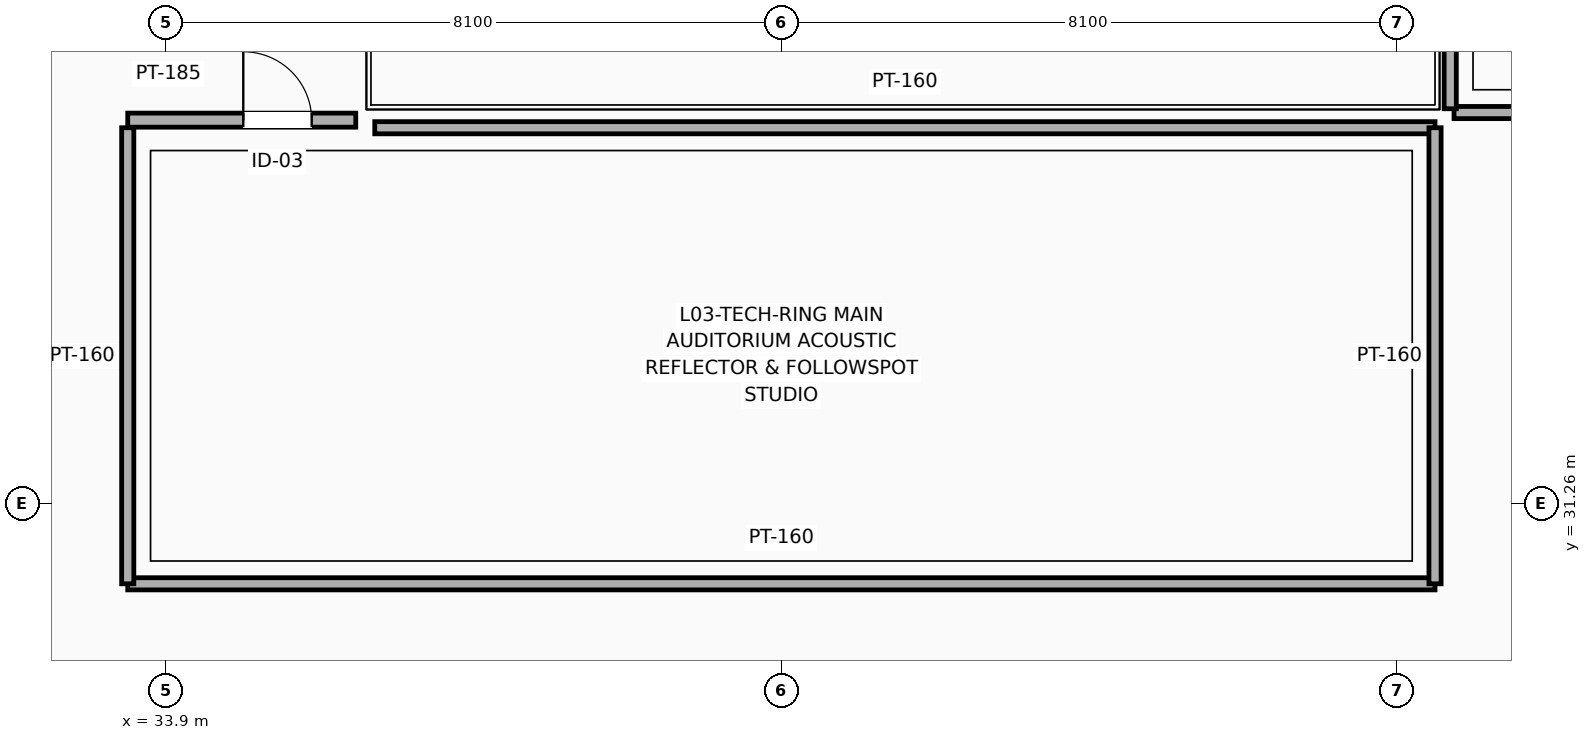
"""IFC4 building model, lengths in metres.
Left out: names, types, materials, properties, quantities, classifications, styles, units other than length and angle.
Written with IfcOpenShell. Run it as: python <this file> out.ifc"""

import sys

from ifc_helpers import new_model, si_unit, direction, frame, frame_2d, origin, place, context, subcontext, project, spatial, rectangle, extrude, element, fill, save


model = new_model("IFC4")
c1 = context("Model", 3, precision=1e-05, world=origin(), true_north=direction((0.0, 1.0)))
c2 = subcontext(c1, "Body", "Model", "MODEL_VIEW")
j1 = project(units=[si_unit("LENGTHUNIT", "METRE"), si_unit("PLANEANGLEUNIT", "RADIAN")], contexts=[c1])
p1 = place(None, origin())
s1 = spatial("IfcSite", under=j1, at=p1, CompositionType="ELEMENT")
p2 = place(p1, origin())
s2 = spatial("IfcBuilding", under=s1, at=p2, CompositionType="ELEMENT")
p3 = place(p2, frame((0.0, 0.0, 14.7)))
s3 = spatial("IfcBuildingStorey", under=s2, at=p3, CompositionType="ELEMENT", Elevation=14.7)
for number, where, z_axis, x_axis in (
    (1, (52.396, 29.725, 0.0), (0.0, 0.0, 1.0), (-0.672, -0.741, 0.0)),
    (2, (33.91, 27.182, 0.0), (0.0, 0.0, 1.0), (-0.672, 0.741, 0.0)),
):
    element("IfcWall", number, at=place(p3, frame(where, z_axis=z_axis, x_axis=x_axis)), inside=s3, PredefinedType="SHEAR", context=c2, shape_type="SweptSolid", body=[
        extrude(rectangle(XDim=3.433, YDim=0.4, at=frame_2d((1.717, 0.0))), origin(), (0.0, 0.0, 1.0), 13.227),
    ])
p4 = place(p3, frame((33.4, 36.3, 0.0), z_axis=(0.0, 0.0, 1.0), x_axis=(1.0, 0.0, 0.0)))
e3 = element("IfcWall", 3, at=p4, inside=s3, PredefinedType="PARTITIONING", context=c2, shape_type="SweptSolid", body=[
    extrude(rectangle(XDim=3.0, YDim=0.185, at=frame_2d((1.5, 0.0))), origin(), (0.0, 0.0, 1.0), 4.225),
])
p5 = place(p4, frame((1.52, 0.0, 0.0)))
e4 = element("IfcOpeningElement", 4, at=p5, cuts=e3, PredefinedType="OPENING", context=c2, shape_type="SweptSolid", body=[
    extrude(rectangle(XDim=0.9, YDim=2.1, at=frame_2d((0.45, 1.05))), frame((0.0, 0.103, 0.0), z_axis=(0.0, -1.0, 0.0), x_axis=(1.0, 0.0, 0.0)), (0.0, 0.0, 1.0), 0.205),
])
p6 = place(p3, frame((33.4, 30.2, 0.0), z_axis=(0.0, 0.0, 1.0), x_axis=(1.0, 0.0, 0.0)))
e5 = element("IfcWall", 5, at=p6, inside=s3, PredefinedType="PARTITIONING", context=c2, shape_type="SweptSolid", body=[
    extrude(rectangle(XDim=17.2, YDim=0.16, at=frame_2d((8.6, 0.0))), origin(), (0.0, 0.0, 1.0), 4.225),
])
p7 = place(p3, frame((36.65, 36.2, 0.0), z_axis=(0.0, 0.0, 1.0), x_axis=(1.0, 0.0, 0.0)))
e6 = element("IfcWall", 6, at=p7, inside=s3, PredefinedType="PARTITIONING", context=c2, shape_type="SweptSolid", body=[
    extrude(rectangle(XDim=13.95, YDim=0.16, at=frame_2d((6.975, 0.0))), origin(), (0.0, 0.0, 1.0), 4.225),
])
for number, where, z_axis, x_axis in (
    (7, (33.4, 30.2, 0.0), (0.0, 0.0, 1.0), (0.0, 1.0, 0.0)),
    (8, (50.6, 30.2, 0.0), (0.0, 0.0, 1.0), (0.0, 1.0, 0.0)),
):
    element("IfcWall", number, at=place(p3, frame(where, z_axis=z_axis, x_axis=x_axis)), inside=s3, PredefinedType="PARTITIONING", context=c2, shape_type="SweptSolid", body=[
        extrude(rectangle(XDim=6.0, YDim=0.16, at=frame_2d((3.0, 0.0))), origin(), (0.0, 0.0, 1.0), 4.225),
    ])
p8 = place(p3, frame((50.85, 36.4, 0.0), z_axis=(0.0, 0.0, 1.0), x_axis=(1.0, 0.0, 0.0)))
e9 = element("IfcWall", 9, at=p8, inside=s3, PredefinedType="PARTITIONING", context=c2, shape_type="SweptSolid", body=[
    extrude(rectangle(XDim=3.55, YDim=0.16, at=frame_2d((1.775, 0.0))), origin(), (0.0, 0.0, 1.0), 4.225),
])
p9 = place(p3, frame((50.8, 36.45, 0.0), z_axis=(0.0, 0.0, 1.0), x_axis=(0.0, 1.0, 0.0)))
e10 = element("IfcWall", 10, at=p9, inside=s3, PredefinedType="PARTITIONING", context=c2, shape_type="SweptSolid", body=[
    extrude(rectangle(XDim=21.15, YDim=0.16, at=frame_2d((10.575, 0.0))), origin(), (0.0, 0.0, 1.0), 4.225),
])
p10 = place(p5, origin())
e11 = element("IfcDoor", 11, at=p10, inside=s3, OperationType="SINGLE_SWING_LEFT", PredefinedType="DOOR", context=c2, shape_type="SweptSolid", body=[
    extrude(rectangle(XDim=0.9, YDim=2.1, at=frame_2d((0.45, 1.05))), frame((0.0, 0.025, 0.0), z_axis=(0.0, -1.0, 0.0), x_axis=(1.0, 0.0, 0.0)), (0.0, 0.0, 1.0), 0.05),
])
fill(e4, e11)
save(model, sys.argv[1])
